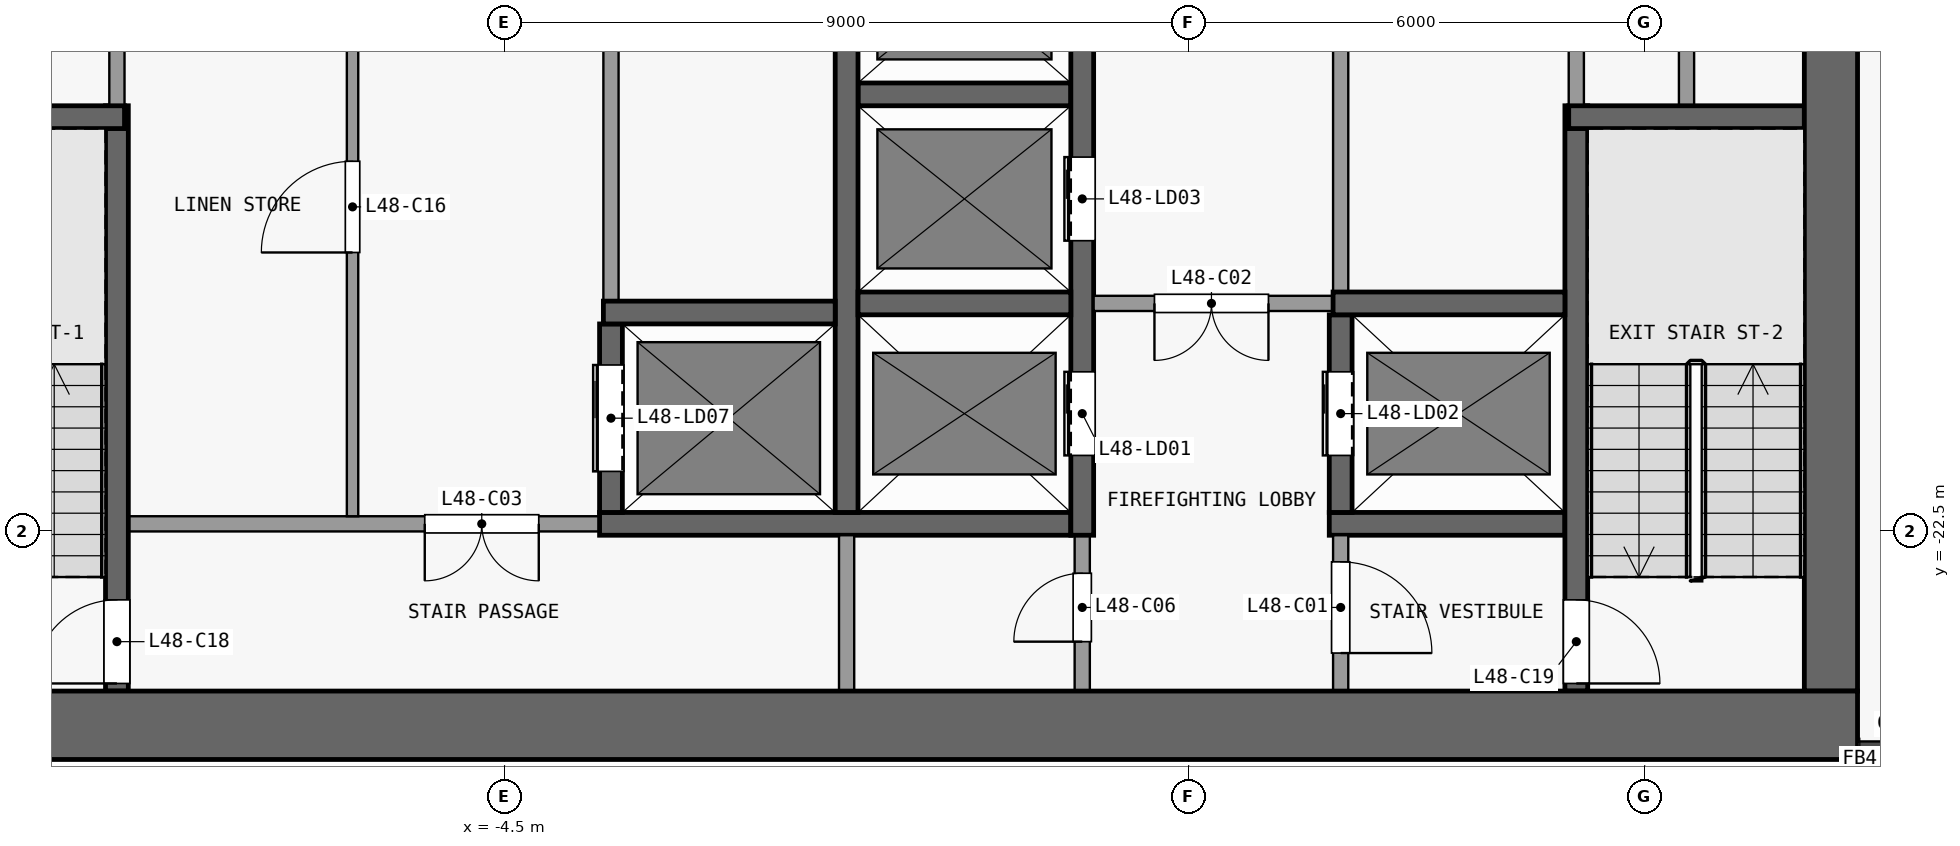
"""IFC4 building model, lengths in metres.
Left out: names, types, materials, properties, quantities, classifications, styles, units other than length and angle.
Written with IfcOpenShell. Run it as: python <this file> out.ifc"""

import sys

from ifc_helpers import new_model, si_unit, direction, frame, frame_2d, origin, place, context, subcontext, project, spatial, rectangle, extrude, element, fill, save


model = new_model("IFC4")
c1 = context("Model", 3, precision=1e-05, world=origin(), true_north=direction((0.0, 1.0)))
c2 = subcontext(c1, "Body", "Model", "MODEL_VIEW")
j1 = project(units=[si_unit("LENGTHUNIT", "METRE"), si_unit("PLANEANGLEUNIT", "RADIAN")], contexts=[c1])
p1 = place(None, origin())
s1 = spatial("IfcSite", under=j1, at=p1, CompositionType="ELEMENT")
p2 = place(p1, origin())
s2 = spatial("IfcBuilding", under=s1, at=p2, CompositionType="ELEMENT")
p3 = place(p2, frame((0.0, 0.0, 192.5)))
s3 = spatial("IfcBuildingStorey", under=s2, at=p3, CompositionType="ELEMENT", Elevation=192.5)
p4 = place(p3, frame((-13.3, -25.05, 0.0), z_axis=(0.0, 0.0, 1.0), x_axis=(1.0, 0.0, 0.0)))
e1 = element("IfcWall", 1, at=p4, inside=s3, PredefinedType="SHEAR", context=c2, shape_type="SweptSolid", body=[
    extrude(rectangle(XDim=26.6, YDim=0.9, at=frame_2d((13.3, 0.0))), origin(), (0.0, 0.0, 1.0), 3.3),
])
p5 = place(p3, frame((12.95, -24.6, 0.0), z_axis=(0.0, 0.0, 1.0), x_axis=(0.0, 1.0, 0.0)))
e2 = element("IfcWall", 2, at=p5, inside=s3, PredefinedType="SHEAR", context=c2, shape_type="SweptSolid", body=[
    extrude(rectangle(XDim=16.1, YDim=0.7, at=frame_2d((8.05, 0.0))), origin(), (0.0, 0.0, 1.0), 3.3),
])
p6 = place(p3, frame((-3.25, -22.4, 0.0), z_axis=(0.0, 0.0, 1.0), x_axis=(-1.0, 0.0, 0.0)))
e3 = element("IfcWall", 3, at=p6, inside=s3, PredefinedType="PARTITIONING", context=c2, shape_type="SweptSolid", body=[
    extrude(rectangle(XDim=6.2, YDim=0.2, at=frame_2d((3.1, 0.0))), origin(), (0.0, 0.0, 1.0), 3.3),
])
p7 = place(p6, frame((0.8, 0.0, 0.0)))
e4 = element("IfcOpeningElement", 4, at=p7, cuts=e3, PredefinedType="OPENING", context=c2, shape_type="SweptSolid", body=[
    extrude(rectangle(XDim=1.5, YDim=2.1, at=frame_2d((0.75, 1.05))), frame((0.0, 0.11, 0.0), z_axis=(0.0, -1.0, 0.0), x_axis=(1.0, 0.0, 0.0)), (0.0, 0.0, 1.0), 0.22),
])
p8 = place(p3, frame((-3.25, -22.4, 0.0), z_axis=(0.0, 0.0, 1.0), x_axis=(1.0, 0.0, 0.0)))
e5 = element("IfcWall", 5, at=p8, inside=s3, PredefinedType="SHEAR", context=c2, shape_type="SweptSolid", body=[
    extrude(rectangle(XDim=6.2, YDim=0.3, at=frame_2d((3.1, 0.0))), origin(), (0.0, 0.0, 1.0), 3.3),
])
p9 = place(p3, frame((6.35, -22.4, 0.0), z_axis=(0.0, 0.0, 1.0), x_axis=(1.0, 0.0, 0.0)))
e6 = element("IfcWall", 6, at=p9, inside=s3, PredefinedType="SHEAR", context=c2, shape_type="SweptSolid", body=[
    extrude(rectangle(XDim=3.1, YDim=0.3, at=frame_2d((1.55, 0.0))), origin(), (0.0, 0.0, 1.0), 3.3),
])
p10 = place(p3, frame((-3.2, -19.62, 0.0), z_axis=(0.0, 0.0, 1.0), x_axis=(1.0, 0.0, 0.0)))
e7 = element("IfcWall", 7, at=p10, inside=s3, PredefinedType="SHEAR", context=c2, shape_type="SweptSolid", body=[
    extrude(rectangle(XDim=3.05, YDim=0.3, at=frame_2d((1.525, 0.0))), origin(), (0.0, 0.0, 1.0), 3.3),
])
p11 = place(p3, frame((0.15, -19.5, 0.0), z_axis=(0.0, 0.0, 1.0), x_axis=(1.0, 0.0, 0.0)))
e8 = element("IfcWall", 8, at=p11, inside=s3, PredefinedType="SHEAR", context=c2, shape_type="SweptSolid", body=[
    extrude(rectangle(XDim=2.8, YDim=0.3, at=frame_2d((1.4, 0.0))), origin(), (0.0, 0.0, 1.0), 3.3),
])
p12 = place(p3, frame((6.4, -19.5, 0.0), z_axis=(0.0, 0.0, 1.0), x_axis=(-1.0, 0.0, 0.0)))
e9 = element("IfcWall", 9, at=p12, inside=s3, PredefinedType="PARTITIONING", context=c2, shape_type="SweptSolid", body=[
    extrude(rectangle(XDim=3.15, YDim=0.2, at=frame_2d((1.575, 0.0))), origin(), (0.0, 0.0, 1.0), 3.3),
])
p13 = place(p12, frame((0.85, 0.0, 0.0)))
e10 = element("IfcOpeningElement", 10, at=p13, cuts=e9, PredefinedType="OPENING", context=c2, shape_type="SweptSolid", body=[
    extrude(rectangle(XDim=1.5, YDim=2.1, at=frame_2d((0.75, 1.05))), frame((0.0, 0.11, 0.0), z_axis=(0.0, -1.0, 0.0), x_axis=(1.0, 0.0, 0.0)), (0.0, 0.0, 1.0), 0.22),
])
p14 = place(p3, frame((6.4, -19.5, 0.0), z_axis=(0.0, 0.0, 1.0), x_axis=(1.0, 0.0, 0.0)))
e11 = element("IfcWall", 11, at=p14, inside=s3, PredefinedType="SHEAR", context=c2, shape_type="SweptSolid", body=[
    extrude(rectangle(XDim=3.05, YDim=0.3, at=frame_2d((1.525, 0.0))), origin(), (0.0, 0.0, 1.0), 3.3),
])
for number, where, z_axis, x_axis in (
    (12, (-12.6, -17.05, 0.0), (0.0, 0.0, 1.0), (1.0, 0.0, 0.0)),
    (13, (9.5, -17.05, 0.0), (0.0, 0.0, 1.0), (1.0, 0.0, 0.0)),
):
    element("IfcWall", number, at=place(p3, frame(where, z_axis=z_axis, x_axis=x_axis)), inside=s3, PredefinedType="SHEAR", context=c2, shape_type="SweptSolid", body=[
        extrude(rectangle(XDim=3.1, YDim=0.3, at=frame_2d((1.55, 0.0))), origin(), (0.0, 0.0, 1.0), 3.3),
    ])
p15 = place(p3, frame((0.15, -16.75, 0.0), z_axis=(0.0, 0.0, 1.0), x_axis=(1.0, 0.0, 0.0)))
e14 = element("IfcWall", 14, at=p15, inside=s3, PredefinedType="SHEAR", context=c2, shape_type="SweptSolid", body=[
    extrude(rectangle(XDim=2.8, YDim=0.3, at=frame_2d((1.4, 0.0))), origin(), (0.0, 0.0, 1.0), 3.3),
])
p16 = place(p3, frame((-9.6, -24.6, 0.0), z_axis=(0.0, 0.0, 1.0), x_axis=(0.0, 1.0, 0.0)))
e15 = element("IfcWall", 15, at=p16, inside=s3, PredefinedType="SHEAR", context=c2, shape_type="SweptSolid", body=[
    extrude(rectangle(XDim=7.7, YDim=0.3, at=frame_2d((3.85, 0.0))), origin(), (0.0, 0.0, 1.0), 3.3),
])
p17 = place(p16, frame((0.1, 0.0, 0.0)))
e16 = element("IfcOpeningElement", 16, at=p17, cuts=e15, PredefinedType="OPENING", context=c2, shape_type="SweptSolid", body=[
    extrude(rectangle(XDim=1.1, YDim=2.1, at=frame_2d((0.55, 1.05))), frame((0.0, 0.16, 0.0), z_axis=(0.0, -1.0, 0.0), x_axis=(1.0, 0.0, 0.0)), (0.0, 0.0, 1.0), 0.32),
])
p18 = place(p3, frame((-9.6, -16.9, 0.0), z_axis=(0.0, 0.0, 1.0), x_axis=(0.0, 1.0, 0.0)))
e17 = element("IfcWall", 17, at=p18, inside=s3, PredefinedType="PARTITIONING", context=c2, shape_type="SweptSolid", body=[
    extrude(rectangle(XDim=5.72, YDim=0.2, at=frame_2d((2.86, 0.0))), origin(), (0.0, 0.0, 1.0), 3.3),
])
p19 = place(p3, frame((-6.5, -22.3, 0.0), z_axis=(0.0, 0.0, 1.0), x_axis=(0.0, 1.0, 0.0)))
e18 = element("IfcWall", 18, at=p19, inside=s3, PredefinedType="PARTITIONING", context=c2, shape_type="SweptSolid", body=[
    extrude(rectangle(XDim=10.92, YDim=0.15, at=frame_2d((5.46, 0.0))), origin(), (0.0, 0.0, 1.0), 3.3),
])
p20 = place(p19, frame((3.47, 0.0, 0.0)))
e19 = element("IfcOpeningElement", 19, at=p20, cuts=e18, PredefinedType="OPENING", context=c2, shape_type="SweptSolid", body=[
    extrude(rectangle(XDim=1.2, YDim=2.1, at=frame_2d((0.6, 1.05))), frame((0.0, 0.085, 0.0), z_axis=(0.0, -1.0, 0.0), x_axis=(1.0, 0.0, 0.0)), (0.0, 0.0, 1.0), 0.17),
])
p21 = place(p19, frame((9.18, 0.0, 0.0)))
e20 = element("IfcOpeningElement", 20, at=p21, cuts=e18, PredefinedType="OPENING", context=c2, shape_type="SweptSolid", body=[
    extrude(rectangle(XDim=0.9, YDim=2.1, at=frame_2d((0.45, 1.05))), frame((0.0, 0.085, 0.0), z_axis=(0.0, -1.0, 0.0), x_axis=(1.0, 0.0, 0.0)), (0.0, 0.0, 1.0), 0.17),
])
p22 = place(p3, frame((-3.1, -22.25, 0.0), z_axis=(0.0, 0.0, 1.0), x_axis=(0.0, 1.0, 0.0)))
e21 = element("IfcWall", 21, at=p22, inside=s3, PredefinedType="SHEAR", context=c2, shape_type="SweptSolid", body=[
    extrude(rectangle(XDim=2.48, YDim=0.3, at=frame_2d((1.24, 0.0))), origin(), (0.0, 0.0, 1.0), 3.3),
])
p23 = place(p22, frame((0.54, 0.0, 0.0)))
e22 = element("IfcOpeningElement", 22, at=p23, cuts=e21, PredefinedType="OPENING", context=c2, shape_type="SweptSolid", body=[
    extrude(rectangle(XDim=1.4, YDim=2.1, at=frame_2d((0.7, 1.05))), frame((0.0, 0.16, 0.0), z_axis=(0.0, -1.0, 0.0), x_axis=(1.0, 0.0, 0.0)), (0.0, 0.0, 1.0), 0.32),
])
p24 = place(p3, frame((-3.1, -8.5, 0.0), z_axis=(0.0, 0.0, 1.0), x_axis=(0.0, -1.0, 0.0)))
e23 = element("IfcWall", 23, at=p24, inside=s3, PredefinedType="PARTITIONING", context=c2, shape_type="SweptSolid", body=[
    extrude(rectangle(XDim=10.97, YDim=0.2, at=frame_2d((5.485, 0.0))), origin(), (0.0, 0.0, 1.0), 3.3),
])
p25 = place(p24, frame((4.96, 0.0, 0.0)))
e24 = element("IfcOpeningElement", 24, at=p25, cuts=e23, PredefinedType="OPENING", context=c2, shape_type="SweptSolid", body=[
    extrude(rectangle(XDim=1.2, YDim=2.1, at=frame_2d((0.6, 1.05))), frame((0.0, 0.11, 0.0), z_axis=(0.0, -1.0, 0.0), x_axis=(1.0, 0.0, 0.0)), (0.0, 0.0, 1.0), 0.22),
])
p26 = place(p3, frame((0.0, -24.6, 0.0), z_axis=(0.0, 0.0, 1.0), x_axis=(0.0, 1.0, 0.0)))
e25 = element("IfcWall", 25, at=p26, inside=s3, PredefinedType="PARTITIONING", context=c2, shape_type="SweptSolid", body=[
    extrude(rectangle(XDim=2.05, YDim=0.2, at=frame_2d((1.025, 0.0))), origin(), (0.0, 0.0, 1.0), 3.3),
])
p27 = place(p3, frame((0.0, -22.25, 0.0), z_axis=(0.0, 0.0, 1.0), x_axis=(0.0, 1.0, 0.0)))
e26 = element("IfcWall", 26, at=p27, inside=s3, PredefinedType="SHEAR", context=c2, shape_type="SweptSolid", body=[
    extrude(rectangle(XDim=13.75, YDim=0.3, at=frame_2d((6.875, 0.0))), origin(), (0.0, 0.0, 1.0), 3.3),
])
p28 = place(p3, frame((3.1, -24.6, 0.0), z_axis=(0.0, 0.0, 1.0), x_axis=(0.0, 1.0, 0.0)))
e27 = element("IfcWall", 27, at=p28, inside=s3, PredefinedType="PARTITIONING", context=c2, shape_type="SweptSolid", body=[
    extrude(rectangle(XDim=2.05, YDim=0.2, at=frame_2d((1.025, 0.0))), origin(), (0.0, 0.0, 1.0), 3.3),
])
p29 = place(p28, frame((0.65, 0.0, 0.0)))
e28 = element("IfcOpeningElement", 28, at=p29, cuts=e27, PredefinedType="OPENING", context=c2, shape_type="SweptSolid", body=[
    extrude(rectangle(XDim=0.9, YDim=2.1, at=frame_2d((0.45, 1.05))), frame((0.0, 0.11, 0.0), z_axis=(0.0, -1.0, 0.0), x_axis=(1.0, 0.0, 0.0)), (0.0, 0.0, 1.0), 0.22),
])
p30 = place(p3, frame((3.1, -22.55, 0.0), z_axis=(0.0, 0.0, 1.0), x_axis=(0.0, 1.0, 0.0)))
e29 = element("IfcWall", 29, at=p30, inside=s3, PredefinedType="SHEAR", context=c2, shape_type="SweptSolid", body=[
    extrude(rectangle(XDim=14.05, YDim=0.3, at=frame_2d((7.025, 0.0))), origin(), (0.0, 0.0, 1.0), 3.3),
])
p31 = place(p30, frame((1.05, 0.0, 0.0)))
e30 = element("IfcOpeningElement", 30, at=p31, cuts=e29, PredefinedType="OPENING", context=c2, shape_type="SweptSolid", body=[
    extrude(rectangle(XDim=1.1, YDim=2.1, at=frame_2d((0.55, 1.05))), frame((0.0, 0.16, 0.0), z_axis=(0.0, -1.0, 0.0), x_axis=(1.0, 0.0, 0.0)), (0.0, 0.0, 1.0), 0.32),
])
p32 = place(p30, frame((3.875, 0.0, 0.0)))
e31 = element("IfcOpeningElement", 31, at=p32, cuts=e29, PredefinedType="OPENING", context=c2, shape_type="SweptSolid", body=[
    extrude(rectangle(XDim=1.1, YDim=2.1, at=frame_2d((0.55, 1.05))), frame((0.0, 0.16, 0.0), z_axis=(0.0, -1.0, 0.0), x_axis=(1.0, 0.0, 0.0)), (0.0, 0.0, 1.0), 0.32),
])
p33 = place(p30, frame((6.625, 0.0, 0.0)))
e32 = element("IfcOpeningElement", 32, at=p33, cuts=e29, PredefinedType="OPENING", context=c2, shape_type="SweptSolid", body=[
    extrude(rectangle(XDim=1.1, YDim=2.1, at=frame_2d((0.55, 1.05))), frame((0.0, 0.16, 0.0), z_axis=(0.0, -1.0, 0.0), x_axis=(1.0, 0.0, 0.0)), (0.0, 0.0, 1.0), 0.32),
])
p34 = place(p30, frame((9.375, 0.0, 0.0)))
e33 = element("IfcOpeningElement", 33, at=p34, cuts=e29, PredefinedType="OPENING", context=c2, shape_type="SweptSolid", body=[
    extrude(rectangle(XDim=1.1, YDim=2.1, at=frame_2d((0.55, 1.05))), frame((0.0, 0.16, 0.0), z_axis=(0.0, -1.0, 0.0), x_axis=(1.0, 0.0, 0.0)), (0.0, 0.0, 1.0), 0.32),
])
p35 = place(p30, frame((12.125, 0.0, 0.0)))
e34 = element("IfcOpeningElement", 34, at=p35, cuts=e29, PredefinedType="OPENING", context=c2, shape_type="SweptSolid", body=[
    extrude(rectangle(XDim=1.1, YDim=2.1, at=frame_2d((0.55, 1.05))), frame((0.0, 0.16, 0.0), z_axis=(0.0, -1.0, 0.0), x_axis=(1.0, 0.0, 0.0)), (0.0, 0.0, 1.0), 0.32),
])
p36 = place(p3, frame((6.5, -22.55, 0.0), z_axis=(0.0, 0.0, 1.0), x_axis=(0.0, -1.0, 0.0)))
e35 = element("IfcWall", 35, at=p36, inside=s3, PredefinedType="PARTITIONING", context=c2, shape_type="SweptSolid", body=[
    extrude(rectangle(XDim=2.05, YDim=0.2, at=frame_2d((1.025, 0.0))), origin(), (0.0, 0.0, 1.0), 3.3),
])
p37 = place(p36, frame((0.35, 0.0, 0.0)))
e36 = element("IfcOpeningElement", 36, at=p37, cuts=e35, PredefinedType="OPENING", context=c2, shape_type="SweptSolid", body=[
    extrude(rectangle(XDim=1.2, YDim=2.1, at=frame_2d((0.6, 1.05))), frame((0.0, 0.11, 0.0), z_axis=(0.0, -1.0, 0.0), x_axis=(1.0, 0.0, 0.0)), (0.0, 0.0, 1.0), 0.22),
])
p38 = place(p3, frame((6.5, -22.25, 0.0), z_axis=(0.0, 0.0, 1.0), x_axis=(0.0, 1.0, 0.0)))
e37 = element("IfcWall", 37, at=p38, inside=s3, PredefinedType="SHEAR", context=c2, shape_type="SweptSolid", body=[
    extrude(rectangle(XDim=2.6, YDim=0.3, at=frame_2d((1.3, 0.0))), origin(), (0.0, 0.0, 1.0), 3.3),
])
p39 = place(p38, frame((0.75, 0.0, 0.0)))
e38 = element("IfcOpeningElement", 38, at=p39, cuts=e37, PredefinedType="OPENING", context=c2, shape_type="SweptSolid", body=[
    extrude(rectangle(XDim=1.1, YDim=2.1, at=frame_2d((0.55, 1.05))), frame((0.0, 0.16, 0.0), z_axis=(0.0, -1.0, 0.0), x_axis=(1.0, 0.0, 0.0)), (0.0, 0.0, 1.0), 0.32),
])
p40 = place(p3, frame((6.5, -8.5, 0.0), z_axis=(0.0, 0.0, 1.0), x_axis=(0.0, -1.0, 0.0)))
e39 = element("IfcWall", 39, at=p40, inside=s3, PredefinedType="PARTITIONING", context=c2, shape_type="SweptSolid", body=[
    extrude(rectangle(XDim=10.85, YDim=0.2, at=frame_2d((5.425, 0.0))), origin(), (0.0, 0.0, 1.0), 3.3),
])
p41 = place(p40, frame((4.9, 0.0, 0.0)))
e40 = element("IfcOpeningElement", 40, at=p41, cuts=e39, PredefinedType="OPENING", context=c2, shape_type="SweptSolid", body=[
    extrude(rectangle(XDim=1.2, YDim=2.1, at=frame_2d((0.6, 1.05))), frame((0.0, 0.11, 0.0), z_axis=(0.0, -1.0, 0.0), x_axis=(1.0, 0.0, 0.0)), (0.0, 0.0, 1.0), 0.22),
])
p42 = place(p3, frame((9.6, -16.9, 0.0), z_axis=(0.0, 0.0, 1.0), x_axis=(0.0, -1.0, 0.0)))
e41 = element("IfcWall", 41, at=p42, inside=s3, PredefinedType="SHEAR", context=c2, shape_type="SweptSolid", body=[
    extrude(rectangle(XDim=7.7, YDim=0.3, at=frame_2d((3.85, 0.0))), origin(), (0.0, 0.0, 1.0), 3.3),
])
p43 = place(p42, frame((6.5, 0.0, 0.0)))
e42 = element("IfcOpeningElement", 42, at=p43, cuts=e41, PredefinedType="OPENING", context=c2, shape_type="SweptSolid", body=[
    extrude(rectangle(XDim=1.1, YDim=2.1, at=frame_2d((0.55, 1.05))), frame((0.0, 0.16, 0.0), z_axis=(0.0, -1.0, 0.0), x_axis=(1.0, 0.0, 0.0)), (0.0, 0.0, 1.0), 0.32),
])
p44 = place(p3, frame((9.6, -16.9, 0.0), z_axis=(0.0, 0.0, 1.0), x_axis=(0.0, 1.0, 0.0)))
e43 = element("IfcWall", 43, at=p44, inside=s3, PredefinedType="PARTITIONING", context=c2, shape_type="SweptSolid", body=[
    extrude(rectangle(XDim=8.4, YDim=0.2, at=frame_2d((4.2, 0.0))), origin(), (0.0, 0.0, 1.0), 3.3),
])
p45 = place(p3, frame((11.05, -10.5, 0.0), z_axis=(0.0, 0.0, 1.0), x_axis=(0.0, -1.0, 0.0)))
e44 = element("IfcWall", 44, at=p45, inside=s3, PredefinedType="PARTITIONING", context=c2, shape_type="SweptSolid", body=[
    extrude(rectangle(XDim=6.4, YDim=0.2, at=frame_2d((3.2, 0.0))), origin(), (0.0, 0.0, 1.0), 3.3),
])
p46 = place(p45, frame((2.875, 0.0, 0.0)))
e45 = element("IfcOpeningElement", 45, at=p46, cuts=e44, PredefinedType="OPENING", context=c2, shape_type="SweptSolid", body=[
    extrude(rectangle(XDim=0.9, YDim=2.1, at=frame_2d((0.45, 1.05))), frame((0.0, 0.11, 0.0), z_axis=(0.0, -1.0, 0.0), x_axis=(1.0, 0.0, 0.0)), (0.0, 0.0, 1.0), 0.22),
])
p47 = place(p31, origin())
e46 = element("IfcDoor", 46, at=p47, inside=s3, OperationType="DOUBLE_DOOR_SLIDING", PredefinedType="DOOR", context=c2, shape_type="SweptSolid", body=[
    extrude(rectangle(XDim=1.1, YDim=2.1, at=frame_2d((0.55, 1.05))), frame((0.0, 0.025, 0.0), z_axis=(0.0, -1.0, 0.0), x_axis=(1.0, 0.0, 0.0)), (0.0, 0.0, 1.0), 0.05),
])
fill(e30, e46)
p48 = place(p39, origin())
e47 = element("IfcDoor", 47, at=p48, inside=s3, OperationType="DOUBLE_DOOR_SLIDING", PredefinedType="DOOR", context=c2, shape_type="SweptSolid", body=[
    extrude(rectangle(XDim=1.1, YDim=2.1, at=frame_2d((0.55, 1.05))), frame((0.0, 0.025, 0.0), z_axis=(0.0, -1.0, 0.0), x_axis=(1.0, 0.0, 0.0)), (0.0, 0.0, 1.0), 0.05),
])
fill(e38, e47)
p49 = place(p32, origin())
e48 = element("IfcDoor", 48, at=p49, inside=s3, OperationType="DOUBLE_DOOR_SLIDING", PredefinedType="DOOR", context=c2, shape_type="SweptSolid", body=[
    extrude(rectangle(XDim=1.1, YDim=2.1, at=frame_2d((0.55, 1.05))), frame((0.0, 0.025, 0.0), z_axis=(0.0, -1.0, 0.0), x_axis=(1.0, 0.0, 0.0)), (0.0, 0.0, 1.0), 0.05),
])
fill(e31, e48)
p50 = place(p23, origin())
e49 = element("IfcDoor", 49, at=p50, inside=s3, OperationType="DOUBLE_DOOR_SLIDING", PredefinedType="DOOR", context=c2, shape_type="SweptSolid", body=[
    extrude(rectangle(XDim=1.4, YDim=2.1, at=frame_2d((0.7, 1.05))), frame((0.0, 0.025, 0.0), z_axis=(0.0, -1.0, 0.0), x_axis=(1.0, 0.0, 0.0)), (0.0, 0.0, 1.0), 0.05),
])
fill(e22, e49)
p51 = place(p37, origin())
e50 = element("IfcDoor", 50, at=p51, inside=s3, OperationType="SINGLE_SWING_RIGHT", PredefinedType="DOOR", context=c2, shape_type="SweptSolid", body=[
    extrude(rectangle(XDim=1.2, YDim=2.1, at=frame_2d((0.6, 1.05))), frame((0.0, 0.025, 0.0), z_axis=(0.0, -1.0, 0.0), x_axis=(1.0, 0.0, 0.0)), (0.0, 0.0, 1.0), 0.05),
])
fill(e36, e50)
p52 = place(p13, origin())
e51 = element("IfcDoor", 51, at=p52, inside=s3, OperationType="DOUBLE_DOOR_SINGLE_SWING", PredefinedType="DOOR", context=c2, shape_type="SweptSolid", body=[
    extrude(rectangle(XDim=1.5, YDim=2.1, at=frame_2d((0.75, 1.05))), frame((0.0, 0.025, 0.0), z_axis=(0.0, -1.0, 0.0), x_axis=(1.0, 0.0, 0.0)), (0.0, 0.0, 1.0), 0.05),
])
fill(e10, e51)
p53 = place(p7, origin())
e52 = element("IfcDoor", 52, at=p53, inside=s3, OperationType="DOUBLE_DOOR_SINGLE_SWING", PredefinedType="DOOR", context=c2, shape_type="SweptSolid", body=[
    extrude(rectangle(XDim=1.5, YDim=2.1, at=frame_2d((0.75, 1.05))), frame((0.0, 0.025, 0.0), z_axis=(0.0, -1.0, 0.0), x_axis=(1.0, 0.0, 0.0)), (0.0, 0.0, 1.0), 0.05),
])
fill(e4, e52)
p54 = place(p29, origin())
e53 = element("IfcDoor", 53, at=p54, inside=s3, OperationType="SINGLE_SWING_LEFT", PredefinedType="DOOR", context=c2, shape_type="SweptSolid", body=[
    extrude(rectangle(XDim=0.9, YDim=2.1, at=frame_2d((0.45, 1.05))), frame((0.0, 0.025, 0.0), z_axis=(0.0, -1.0, 0.0), x_axis=(1.0, 0.0, 0.0)), (0.0, 0.0, 1.0), 0.05),
])
fill(e28, e53)
p55 = place(p20, origin())
e54 = element("IfcDoor", 54, at=p55, inside=s3, OperationType="SINGLE_SWING_LEFT", PredefinedType="DOOR", context=c2, shape_type="SweptSolid", body=[
    extrude(rectangle(XDim=1.2, YDim=2.1, at=frame_2d((0.6, 1.05))), frame((0.0, 0.025, 0.0), z_axis=(0.0, -1.0, 0.0), x_axis=(1.0, 0.0, 0.0)), (0.0, 0.0, 1.0), 0.05),
])
fill(e19, e54)
p56 = place(p17, origin())
e55 = element("IfcDoor", 55, at=p56, inside=s3, OperationType="SINGLE_SWING_LEFT", PredefinedType="DOOR", context=c2, shape_type="SweptSolid", body=[
    extrude(rectangle(XDim=1.1, YDim=2.1, at=frame_2d((0.55, 1.05))), frame((0.0, 0.025, 0.0), z_axis=(0.0, -1.0, 0.0), x_axis=(1.0, 0.0, 0.0)), (0.0, 0.0, 1.0), 0.05),
])
fill(e16, e55)
p57 = place(p43, origin())
e56 = element("IfcDoor", 56, at=p57, inside=s3, OperationType="SINGLE_SWING_RIGHT", PredefinedType="DOOR", context=c2, shape_type="SweptSolid", body=[
    extrude(rectangle(XDim=1.1, YDim=2.1, at=frame_2d((0.55, 1.05))), frame((0.0, 0.025, 0.0), z_axis=(0.0, -1.0, 0.0), x_axis=(1.0, 0.0, 0.0)), (0.0, 0.0, 1.0), 0.05),
])
fill(e42, e56)
save(model, sys.argv[1])
